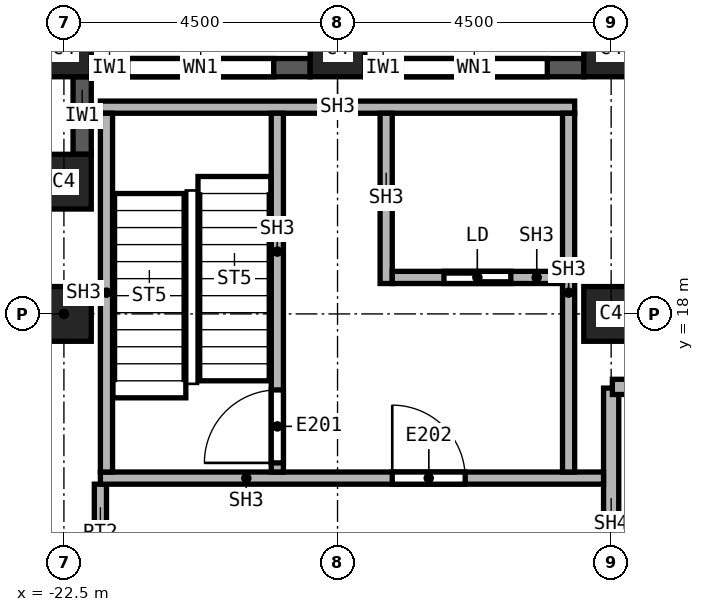
"""IFC4 building model, lengths in metres.
Left out: names, types, materials, properties, quantities, classifications, styles, units other than length and angle.
Written with IfcOpenShell. Run it as: python <this file> out.ifc"""

import sys

from ifc_helpers import new_model, si_unit, direction, frame, frame_2d, origin, origin_2d, place, context, subcontext, project, spatial, rectangle, extrude, element, fill, save


model = new_model("IFC4")
c1 = context("Model", 3, precision=1e-05, world=origin(), true_north=direction((0.0, 1.0)))
c2 = subcontext(c1, "Body", "Model", "MODEL_VIEW")
j1 = project(units=[si_unit("LENGTHUNIT", "METRE"), si_unit("PLANEANGLEUNIT", "RADIAN")], contexts=[c1])
p1 = place(None, origin())
s1 = spatial("IfcSite", under=j1, at=p1, CompositionType="ELEMENT")
p2 = place(p1, origin())
s2 = spatial("IfcBuilding", under=s1, at=p2, CompositionType="ELEMENT")
p3 = place(p2, frame((0.0, 0.0, 286.0)))
s3 = spatial("IfcBuildingStorey", under=s2, at=p3, CompositionType="ELEMENT", Elevation=286.0)
for number, where, z_axis, x_axis in (
    (1, (-13.5, 18.0, 0.0), (0.0, 0.0, 1.0), (1.0, 0.0, 0.0)),
    (2, (-22.5, 18.0, 0.0), (0.0, 0.0, 1.0), (1.0, 0.0, 0.0)),
    (3, (-13.5, 22.35, 0.0), (0.0, 0.0, 1.0), (1.0, 0.0, 0.0)),
    (4, (-18.0, 22.35, 0.0), (0.0, 0.0, 1.0), (1.0, 0.0, 0.0)),
    (5, (-22.5, 22.35, 0.0), (0.0, 0.0, 1.0), (1.0, 0.0, 0.0)),
    (6, (-22.5, 20.175, 0.0), (0.0, 0.0, 1.0), (1.0, 0.0, 0.0)),
):
    element("IfcColumn", number, at=place(p3, frame(where, z_axis=z_axis, x_axis=x_axis)), inside=s3, PredefinedType="COLUMN", context=c2, shape_type="SweptSolid", body=[
        extrude(rectangle(XDim=0.9, YDim=0.9, at=origin_2d()), origin(), (0.0, 0.0, 1.0), 3.72),
    ])
p4 = place(p3, frame((-13.95, 22.05, 0.0), z_axis=(0.0, 0.0, 1.0), x_axis=(-1.0, 0.0, 0.0)))
e7 = element("IfcWall", 7, at=p4, inside=s3, PredefinedType="SOLIDWALL", context=c2, shape_type="SweptSolid", body=[
    extrude(rectangle(XDim=3.6, YDim=0.3, at=frame_2d((1.8, 0.0))), origin(), (0.0, 0.0, 1.0), 3.12),
])
p5 = place(p4, frame((0.6, 0.0, 0.8)))
e8 = element("IfcOpeningElement", 8, at=p5, cuts=e7, PredefinedType="OPENING", context=c2, shape_type="SweptSolid", body=[
    extrude(rectangle(XDim=2.4, YDim=1.95, at=frame_2d((1.2, 0.975))), frame((0.0, 0.15, 0.0), z_axis=(0.0, -1.0, 0.0), x_axis=(1.0, 0.0, 0.0)), (0.0, 0.0, 1.0), 0.3),
])
p6 = place(p3, frame((-18.45, 22.05, 0.0), z_axis=(0.0, 0.0, 1.0), x_axis=(-1.0, 0.0, 0.0)))
e9 = element("IfcWall", 9, at=p6, inside=s3, PredefinedType="SOLIDWALL", context=c2, shape_type="SweptSolid", body=[
    extrude(rectangle(XDim=3.6, YDim=0.3, at=frame_2d((1.8, 0.0))), origin(), (0.0, 0.0, 1.0), 3.12),
])
p7 = place(p6, frame((0.6, 0.0, 0.8)))
e10 = element("IfcOpeningElement", 10, at=p7, cuts=e9, PredefinedType="OPENING", context=c2, shape_type="SweptSolid", body=[
    extrude(rectangle(XDim=2.4, YDim=1.95, at=frame_2d((1.2, 0.975))), frame((0.0, 0.15, 0.0), z_axis=(0.0, -1.0, 0.0), x_axis=(1.0, 0.0, 0.0)), (0.0, 0.0, 1.0), 0.3),
])
p8 = place(p3, frame((-22.2, 21.9, 0.0), z_axis=(0.0, 0.0, 1.0), x_axis=(0.0, -1.0, 0.0)))
e11 = element("IfcWall", 11, at=p8, inside=s3, PredefinedType="SOLIDWALL", context=c2, shape_type="SweptSolid", body=[
    extrude(rectangle(XDim=1.275, YDim=0.3, at=frame_2d((0.637, 0.0))), origin(), (0.0, 0.0, 1.0), 3.12),
])
p9 = place(p3, frame((-21.9, 13.5, 0.0), z_axis=(0.0, 0.0, 1.0), x_axis=(0.0, 1.0, 0.0)))
e12 = element("IfcWall", 12, at=p9, inside=s3, PredefinedType="PARTITIONING", context=c2, shape_type="SweptSolid", body=[
    extrude(rectangle(XDim=1.7, YDim=0.2, at=frame_2d((0.85, 0.0))), origin(), (0.0, 0.0, 1.0), 3.72),
])
p10 = place(p3, frame((-13.5, 16.78, 0.0), z_axis=(0.0, 0.0, 1.0), x_axis=(0.0, -1.0, 0.0)))
e13 = element("IfcWall", 13, at=p10, inside=s3, PredefinedType="SOLIDWALL", context=c2, shape_type="SweptSolid", body=[
    extrude(rectangle(XDim=4.605, YDim=0.25, at=frame_2d((2.302, 0.0))), origin(), (0.0, 0.0, 1.0), 3.72),
])
p11 = place(p3, frame((-13.48, 16.8, 0.0), z_axis=(0.0, 0.0, 1.0), x_axis=(1.0, 0.0, 0.0)))
e14 = element("IfcWall", 14, at=p11, inside=s3, PredefinedType="SOLIDWALL", context=c2, shape_type="SweptSolid", body=[
    extrude(rectangle(XDim=8.96, YDim=0.25, at=frame_2d((4.48, 0.0))), origin(), (0.0, 0.0, 1.0), 3.72),
])
p12 = place(p3, frame((-21.9, 15.3, 0.0), z_axis=(0.0, 0.0, 1.0), x_axis=(1.0, 0.0, 0.0)))
e15 = element("IfcWall", 15, at=p12, inside=s3, PredefinedType="SOLIDWALL", context=c2, shape_type="SweptSolid", body=[
    extrude(rectangle(XDim=8.275, YDim=0.2, at=frame_2d((4.137, 0.0))), origin(), (0.0, 0.0, 1.0), 3.72),
])
p13 = place(p12, frame((4.8, 0.0, 0.0)))
e16 = element("IfcOpeningElement", 16, at=p13, cuts=e15, PredefinedType="OPENING", context=c2, shape_type="SweptSolid", body=[
    extrude(rectangle(XDim=1.2, YDim=2.1, at=frame_2d((0.6, 1.05))), frame((0.0, 0.1, 0.0), z_axis=(0.0, -1.0, 0.0), x_axis=(1.0, 0.0, 0.0)), (0.0, 0.0, 1.0), 0.2),
])
p14 = place(p3, frame((-21.9, 21.4, 0.0), z_axis=(0.0, 0.0, 1.0), x_axis=(1.0, 0.0, 0.0)))
e17 = element("IfcWall", 17, at=p14, inside=s3, PredefinedType="SOLIDWALL", context=c2, shape_type="SweptSolid", body=[
    extrude(rectangle(XDim=7.8, YDim=0.2, at=frame_2d((3.9, 0.0))), origin(), (0.0, 0.0, 1.0), 3.72),
])
for number, where, z_axis, x_axis in (
    (18, (-21.8, 15.4, 0.0), (0.0, 0.0, 1.0), (0.0, 1.0, 0.0)),
    (19, (-14.2, 15.4, 0.0), (0.0, 0.0, 1.0), (0.0, 1.0, 0.0)),
):
    element("IfcWall", number, at=place(p3, frame(where, z_axis=z_axis, x_axis=x_axis)), inside=s3, PredefinedType="SOLIDWALL", context=c2, shape_type="SweptSolid", body=[
        extrude(rectangle(XDim=5.9, YDim=0.2, at=frame_2d((2.95, 0.0))), origin(), (0.0, 0.0, 1.0), 3.72),
    ])
p15 = place(p3, frame((-18.99, 15.4, 0.0), z_axis=(0.0, 0.0, 1.0), x_axis=(0.0, 1.0, 0.0)))
e20 = element("IfcWall", 20, at=p15, inside=s3, PredefinedType="SOLIDWALL", context=c2, shape_type="SweptSolid", body=[
    extrude(rectangle(XDim=5.9, YDim=0.2, at=frame_2d((2.95, 0.0))), origin(), (0.0, 0.0, 1.0), 3.72),
])
p16 = place(p15, frame((0.15, 0.0, 0.0)))
e21 = element("IfcOpeningElement", 21, at=p16, cuts=e20, PredefinedType="OPENING", context=c2, shape_type="SweptSolid", body=[
    extrude(rectangle(XDim=1.2, YDim=2.1, at=frame_2d((0.6, 1.05))), frame((0.0, 0.1, 0.0), z_axis=(0.0, -1.0, 0.0), x_axis=(1.0, 0.0, 0.0)), (0.0, 0.0, 1.0), 0.2),
])
p17 = place(p3, frame((-17.2, 18.5, 0.0), z_axis=(0.0, 0.0, 1.0), x_axis=(0.0, 1.0, 0.0)))
e22 = element("IfcWall", 22, at=p17, inside=s3, PredefinedType="SOLIDWALL", context=c2, shape_type="SweptSolid", body=[
    extrude(rectangle(XDim=2.8, YDim=0.2, at=frame_2d((1.4, 0.0))), origin(), (0.0, 0.0, 1.0), 3.72),
])
p18 = place(p3, frame((-17.1, 18.6, 0.0), z_axis=(0.0, 0.0, 1.0), x_axis=(1.0, 0.0, 0.0)))
e23 = element("IfcWall", 23, at=p18, inside=s3, PredefinedType="SOLIDWALL", context=c2, shape_type="SweptSolid", body=[
    extrude(rectangle(XDim=2.8, YDim=0.2, at=frame_2d((1.4, 0.0))), origin(), (0.0, 0.0, 1.0), 3.72),
])
p19 = place(p18, frame((0.85, 0.0, 0.0)))
e24 = element("IfcOpeningElement", 24, at=p19, cuts=e23, PredefinedType="OPENING", context=c2, shape_type="SweptSolid", body=[
    extrude(rectangle(XDim=1.1, YDim=2.1, at=frame_2d((0.55, 1.05))), frame((0.0, 0.1, 0.0), z_axis=(0.0, -1.0, 0.0), x_axis=(1.0, 0.0, 0.0)), (0.0, 0.0, 1.0), 0.2),
])
p20 = place(p5, origin())
e25 = element("IfcWindow", 25, at=p20, inside=s3, PartitioningType="SINGLE_PANEL", PredefinedType="WINDOW", context=c2, shape_type="SweptSolid", body=[
    extrude(rectangle(XDim=2.4, YDim=1.95, at=frame_2d((1.2, 0.975))), frame((0.0, 0.03, 0.0), z_axis=(0.0, -1.0, 0.0), x_axis=(1.0, 0.0, 0.0)), (0.0, 0.0, 1.0), 0.06),
])
fill(e8, e25)
p21 = place(p7, origin())
e26 = element("IfcWindow", 26, at=p21, inside=s3, PartitioningType="SINGLE_PANEL", PredefinedType="WINDOW", context=c2, shape_type="SweptSolid", body=[
    extrude(rectangle(XDim=2.4, YDim=1.95, at=frame_2d((1.2, 0.975))), frame((0.0, 0.03, 0.0), z_axis=(0.0, -1.0, 0.0), x_axis=(1.0, 0.0, 0.0)), (0.0, 0.0, 1.0), 0.06),
])
fill(e10, e26)
p22 = place(p16, origin())
e27 = element("IfcDoor", 27, at=p22, inside=s3, OperationType="SINGLE_SWING_LEFT", PredefinedType="DOOR", context=c2, shape_type="SweptSolid", body=[
    extrude(rectangle(XDim=1.2, YDim=2.1, at=frame_2d((0.6, 1.05))), frame((0.0, 0.025, 0.0), z_axis=(0.0, -1.0, 0.0), x_axis=(1.0, 0.0, 0.0)), (0.0, 0.0, 1.0), 0.05),
])
fill(e21, e27)
p23 = place(p19, origin())
e28 = element("IfcDoor", 28, at=p23, inside=s3, OperationType="SLIDING_TO_LEFT", PredefinedType="DOOR", context=c2, shape_type="SweptSolid", body=[
    extrude(rectangle(XDim=1.1, YDim=2.1, at=frame_2d((0.55, 1.05))), frame((0.0, 0.025, 0.0), z_axis=(0.0, -1.0, 0.0), x_axis=(1.0, 0.0, 0.0)), (0.0, 0.0, 1.0), 0.05),
])
fill(e24, e28)
p24 = place(p13, origin())
e29 = element("IfcDoor", 29, at=p24, inside=s3, OperationType="SINGLE_SWING_RIGHT", PredefinedType="DOOR", context=c2, shape_type="SweptSolid", body=[
    extrude(rectangle(XDim=1.2, YDim=2.1, at=frame_2d((0.6, 1.05))), frame((0.0, 0.025, 0.0), z_axis=(0.0, -1.0, 0.0), x_axis=(1.0, 0.0, 0.0)), (0.0, 0.0, 1.0), 0.05),
])
fill(e16, e29)
save(model, sys.argv[1])
